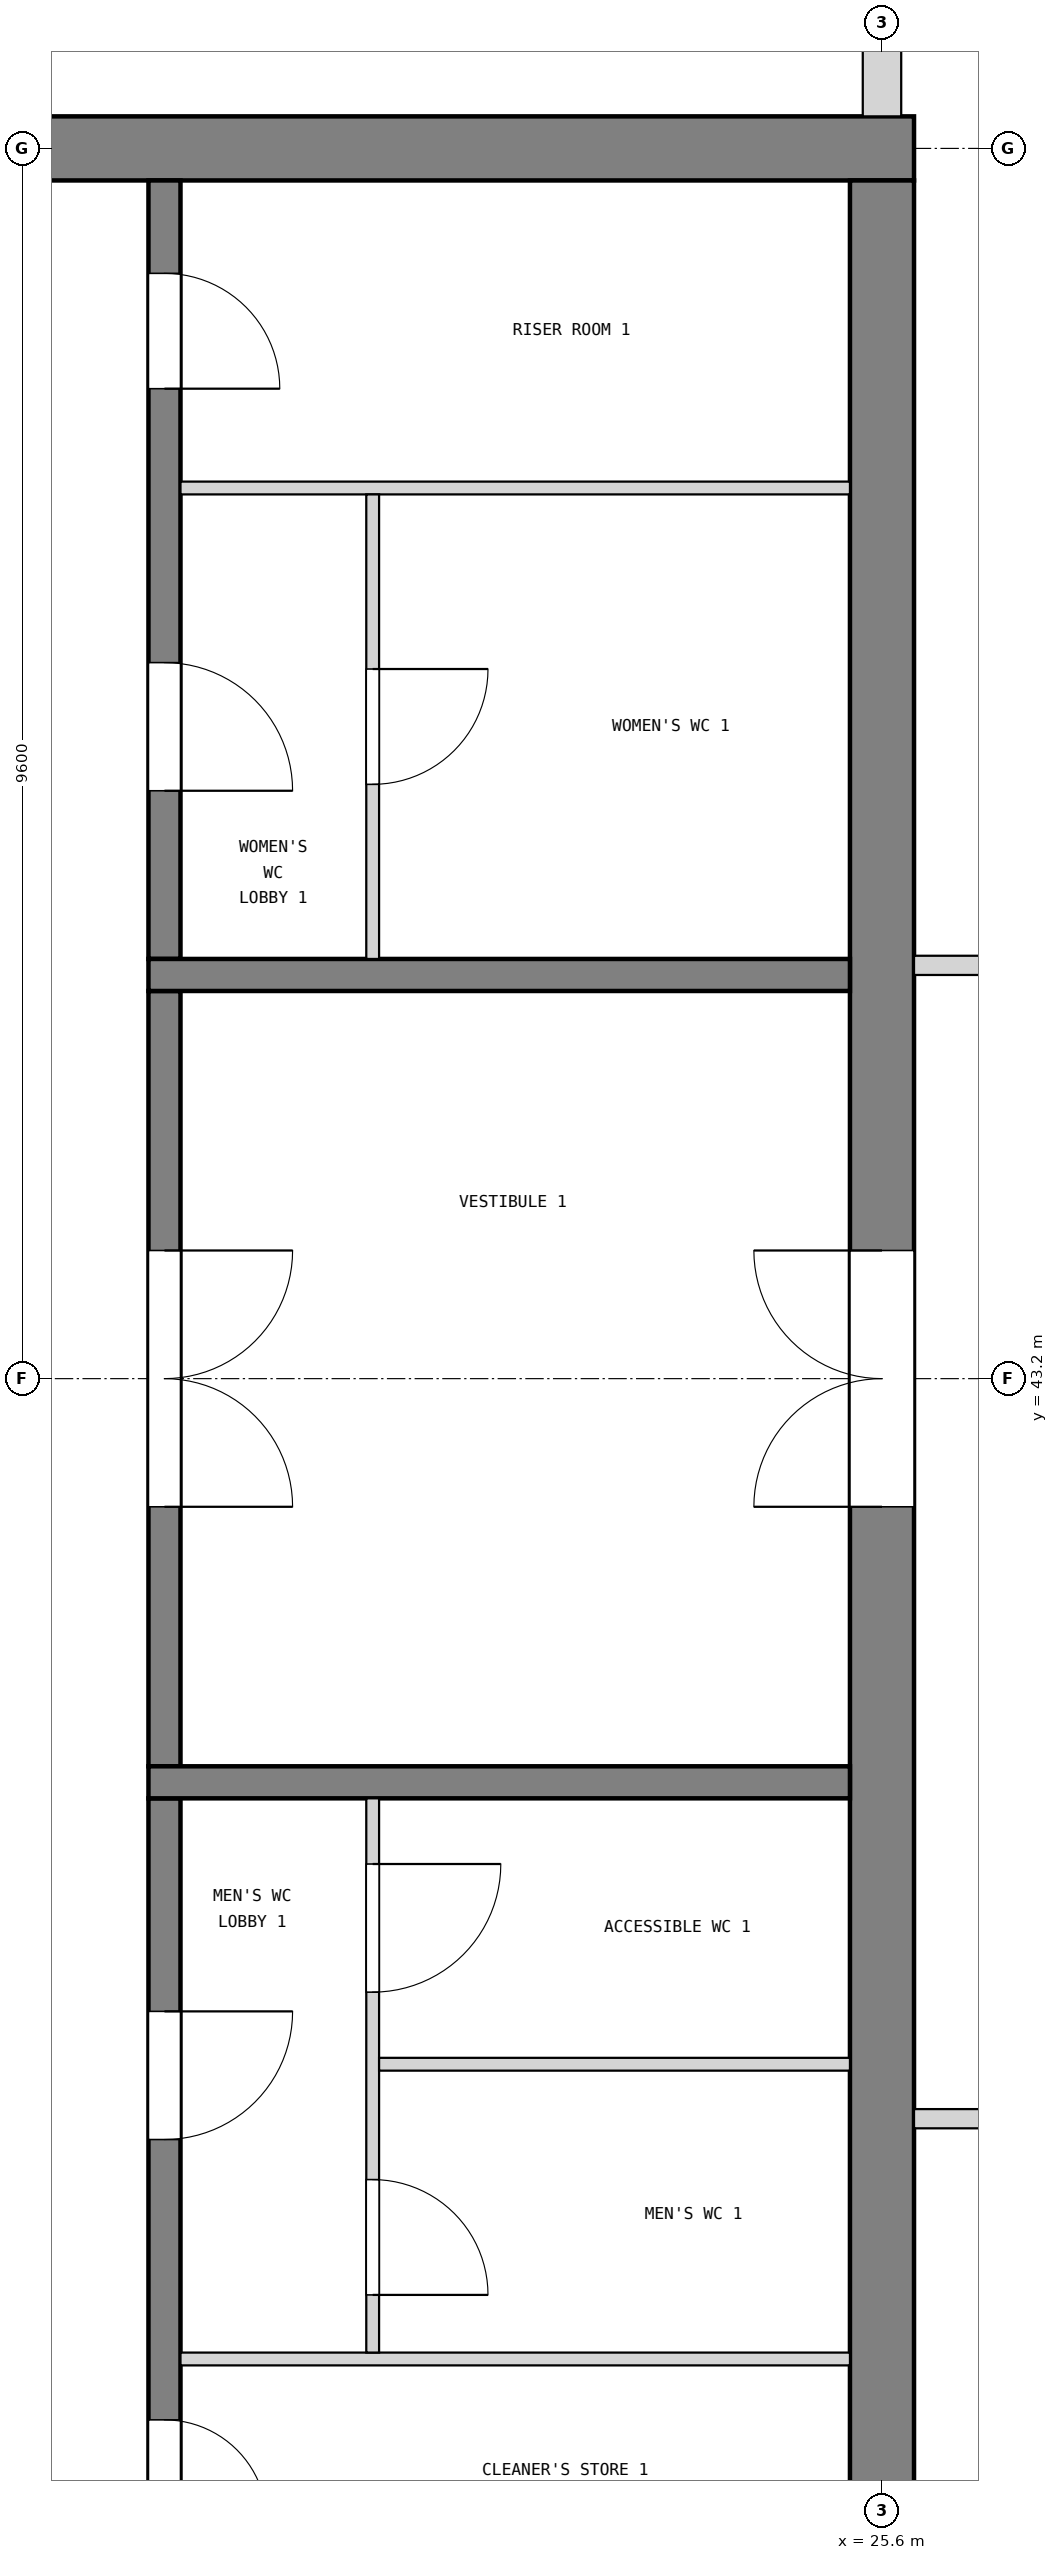
"""IFC4 building model, lengths in metres.
Left out: names, types, materials, properties, quantities, classifications, styles, units other than length and angle.
Written with IfcOpenShell. Run it as: python <this file> out.ifc"""

import sys

from ifc_helpers import new_model, si_unit, direction, frame, frame_2d, origin, place, context, subcontext, project, spatial, rectangle, extrude, element, fill, save


model = new_model("IFC4")
c1 = context("Model", 3, precision=1e-05, world=origin(), true_north=direction((0.0, 1.0)))
c2 = subcontext(c1, "Body", "Model", "MODEL_VIEW")
j1 = project(units=[si_unit("LENGTHUNIT", "METRE"), si_unit("PLANEANGLEUNIT", "RADIAN")], contexts=[c1])
p1 = place(None, origin())
s1 = spatial("IfcSite", under=j1, at=p1, CompositionType="ELEMENT")
p2 = place(p1, origin())
s2 = spatial("IfcBuilding", under=s1, at=p2, CompositionType="ELEMENT")
p3 = place(p2, frame((0.0, 0.0, 28.8)))
s3 = spatial("IfcBuildingStorey", under=s2, at=p3, CompositionType="ELEMENT", Elevation=28.8)
p4 = place(p3, frame((12.55, 52.8, 0.0), z_axis=(0.0, 0.0, 1.0), x_axis=(1.0, 0.0, 0.0)))
e1 = element("IfcWall", 1, at=p4, inside=s3, PredefinedType="SHEAR", context=c2, shape_type="SweptSolid", body=[
    extrude(rectangle(XDim=13.3, YDim=0.5, at=frame_2d((6.65, 0.0))), origin(), (0.0, 0.0, 1.0), 3.9),
])
p5 = place(p4, frame((1.85, 0.0, 1.0)))
e2 = element("IfcOpeningElement", 2, at=p5, cuts=e1, PredefinedType="OPENING", context=c2, shape_type="SweptSolid", body=[
    extrude(rectangle(XDim=0.4, YDim=2.0, at=frame_2d((0.2, 1.0))), frame((0.0, 0.26, 0.0), z_axis=(0.0, -1.0, 0.0), x_axis=(1.0, 0.0, 0.0)), (0.0, 0.0, 1.0), 0.52),
])
p6 = place(p3, frame((25.6, 33.85, 0.0), z_axis=(0.0, 0.0, 1.0), x_axis=(0.0, 1.0, 0.0)))
e3 = element("IfcWall", 3, at=p6, inside=s3, PredefinedType="SHEAR", context=c2, shape_type="SweptSolid", body=[
    extrude(rectangle(XDim=18.7, YDim=0.5, at=frame_2d((9.35, 0.0))), origin(), (0.0, 0.0, 1.0), 3.9),
])
p7 = place(p6, frame((8.35, 0.0, 0.0)))
e4 = element("IfcOpeningElement", 4, at=p7, cuts=e3, PredefinedType="OPENING", context=c2, shape_type="SweptSolid", body=[
    extrude(rectangle(XDim=2.0, YDim=2.1, at=frame_2d((1.0, 1.05))), frame((0.0, 0.26, 0.0), z_axis=(0.0, -1.0, 0.0), x_axis=(1.0, 0.0, 0.0)), (0.0, 0.0, 1.0), 0.52),
])
p8 = place(p3, frame((25.6, 53.05, 0.0), z_axis=(0.0, 0.0, 1.0), x_axis=(0.0, 1.0, 0.0)))
e5 = element("IfcWall", 5, at=p8, inside=s3, PredefinedType="SOLIDWALL", context=c2, shape_type="SweptSolid", body=[
    extrude(rectangle(XDim=2.35, YDim=0.3, at=frame_2d((1.175, 0.0))), origin(), (0.0, 0.0, 1.0), 2.88),
])
p9 = place(p3, frame((20.0, 33.85, 0.0), z_axis=(0.0, 0.0, 1.0), x_axis=(0.0, 1.0, 0.0)))
e6 = element("IfcWall", 6, at=p9, inside=s3, PredefinedType="SOLIDWALL", context=c2, shape_type="SweptSolid", body=[
    extrude(rectangle(XDim=6.075, YDim=0.25, at=frame_2d((3.038, 0.0))), origin(), (0.0, 0.0, 1.0), 3.6),
])
p10 = place(p9, frame((0.425, 0.0, 0.0)))
e7 = element("IfcOpeningElement", 7, at=p10, cuts=e6, PredefinedType="OPENING", context=c2, shape_type="SweptSolid", body=[
    extrude(rectangle(XDim=0.8, YDim=2.1, at=frame_2d((0.4, 1.05))), frame((0.0, 0.135, 0.0), z_axis=(0.0, -1.0, 0.0), x_axis=(1.0, 0.0, 0.0)), (0.0, 0.0, 1.0), 0.27),
])
p11 = place(p9, frame((3.413, 0.0, 0.0)))
e8 = element("IfcOpeningElement", 8, at=p11, cuts=e6, PredefinedType="OPENING", context=c2, shape_type="SweptSolid", body=[
    extrude(rectangle(XDim=1.0, YDim=2.1, at=frame_2d((0.5, 1.05))), frame((0.0, 0.135, 0.0), z_axis=(0.0, -1.0, 0.0), x_axis=(1.0, 0.0, 0.0)), (0.0, 0.0, 1.0), 0.27),
])
p12 = place(p3, frame((20.0, 40.175, 0.0), z_axis=(0.0, 0.0, 1.0), x_axis=(0.0, 1.0, 0.0)))
e9 = element("IfcWall", 9, at=p12, inside=s3, PredefinedType="SOLIDWALL", context=c2, shape_type="SweptSolid", body=[
    extrude(rectangle(XDim=6.05, YDim=0.25, at=frame_2d((3.025, 0.0))), origin(), (0.0, 0.0, 1.0), 3.6),
])
p13 = place(p12, frame((2.025, 0.0, 0.0)))
e10 = element("IfcOpeningElement", 10, at=p13, cuts=e9, PredefinedType="OPENING", context=c2, shape_type="SweptSolid", body=[
    extrude(rectangle(XDim=2.0, YDim=2.1, at=frame_2d((1.0, 1.05))), frame((0.0, 0.135, 0.0), z_axis=(0.0, -1.0, 0.0), x_axis=(1.0, 0.0, 0.0)), (0.0, 0.0, 1.0), 0.27),
])
p14 = place(p3, frame((20.0, 46.475, 0.0), z_axis=(0.0, 0.0, 1.0), x_axis=(0.0, 1.0, 0.0)))
e11 = element("IfcWall", 11, at=p14, inside=s3, PredefinedType="SOLIDWALL", context=c2, shape_type="SweptSolid", body=[
    extrude(rectangle(XDim=6.075, YDim=0.25, at=frame_2d((3.038, 0.0))), origin(), (0.0, 0.0, 1.0), 3.6),
])
p15 = place(p14, frame((1.312, 0.0, 0.0)))
e12 = element("IfcOpeningElement", 12, at=p15, cuts=e11, PredefinedType="OPENING", context=c2, shape_type="SweptSolid", body=[
    extrude(rectangle(XDim=1.0, YDim=2.1, at=frame_2d((0.5, 1.05))), frame((0.0, 0.135, 0.0), z_axis=(0.0, -1.0, 0.0), x_axis=(1.0, 0.0, 0.0)), (0.0, 0.0, 1.0), 0.27),
])
p16 = place(p14, frame((4.45, 0.0, 0.0)))
e13 = element("IfcOpeningElement", 13, at=p16, cuts=e11, PredefinedType="OPENING", context=c2, shape_type="SweptSolid", body=[
    extrude(rectangle(XDim=0.9, YDim=2.1, at=frame_2d((0.45, 1.05))), frame((0.0, 0.135, 0.0), z_axis=(0.0, -1.0, 0.0), x_axis=(1.0, 0.0, 0.0)), (0.0, 0.0, 1.0), 0.27),
])
for number, where, z_axis, x_axis in (
    (14, (19.875, 40.05, 0.0), (0.0, 0.0, 1.0), (1.0, 0.0, 0.0)),
    (15, (19.875, 46.35, 0.0), (0.0, 0.0, 1.0), (1.0, 0.0, 0.0)),
):
    element("IfcWall", number, at=place(p3, frame(where, z_axis=z_axis, x_axis=x_axis)), inside=s3, PredefinedType="SOLIDWALL", context=c2, shape_type="SweptSolid", body=[
        extrude(rectangle(XDim=5.475, YDim=0.25, at=frame_2d((2.738, 0.0))), origin(), (0.0, 0.0, 1.0), 3.6),
    ])
p17 = place(p3, frame((20.125, 35.55, 0.0), z_axis=(0.0, 0.0, 1.0), x_axis=(1.0, 0.0, 0.0)))
e16 = element("IfcWall", 16, at=p17, inside=s3, PredefinedType="PARTITIONING", context=c2, shape_type="SweptSolid", body=[
    extrude(rectangle(XDim=5.225, YDim=0.1, at=frame_2d((2.613, 0.0))), origin(), (0.0, 0.0, 1.0), 3.6),
])
p18 = place(p3, frame((21.625, 35.6, 0.0), z_axis=(0.0, 0.0, 1.0), x_axis=(0.0, 1.0, 0.0)))
e17 = element("IfcWall", 17, at=p18, inside=s3, PredefinedType="PARTITIONING", context=c2, shape_type="SweptSolid", body=[
    extrude(rectangle(XDim=4.325, YDim=0.1, at=frame_2d((2.163, 0.0))), origin(), (0.0, 0.0, 1.0), 3.6),
])
p19 = place(p18, frame((0.45, 0.0, 0.0)))
e18 = element("IfcOpeningElement", 18, at=p19, cuts=e17, PredefinedType="OPENING", context=c2, shape_type="SweptSolid", body=[
    extrude(rectangle(XDim=0.9, YDim=2.1, at=frame_2d((0.45, 1.05))), frame((0.0, 0.06, 0.0), z_axis=(0.0, -1.0, 0.0), x_axis=(1.0, 0.0, 0.0)), (0.0, 0.0, 1.0), 0.12),
])
p20 = place(p18, frame((2.812, 0.0, 0.0)))
e19 = element("IfcOpeningElement", 19, at=p20, cuts=e17, PredefinedType="OPENING", context=c2, shape_type="SweptSolid", body=[
    extrude(rectangle(XDim=1.0, YDim=2.1, at=frame_2d((0.5, 1.05))), frame((0.0, 0.06, 0.0), z_axis=(0.0, -1.0, 0.0), x_axis=(1.0, 0.0, 0.0)), (0.0, 0.0, 1.0), 0.12),
])
p21 = place(p3, frame((21.675, 37.85, 0.0), z_axis=(0.0, 0.0, 1.0), x_axis=(1.0, 0.0, 0.0)))
e20 = element("IfcWall", 20, at=p21, inside=s3, PredefinedType="PARTITIONING", context=c2, shape_type="SweptSolid", body=[
    extrude(rectangle(XDim=3.675, YDim=0.1, at=frame_2d((1.837, 0.0))), origin(), (0.0, 0.0, 1.0), 3.6),
])
p22 = place(p3, frame((20.125, 50.15, 0.0), z_axis=(0.0, 0.0, 1.0), x_axis=(1.0, 0.0, 0.0)))
e21 = element("IfcWall", 21, at=p22, inside=s3, PredefinedType="PARTITIONING", context=c2, shape_type="SweptSolid", body=[
    extrude(rectangle(XDim=5.225, YDim=0.1, at=frame_2d((2.613, 0.0))), origin(), (0.0, 0.0, 1.0), 3.6),
])
p23 = place(p3, frame((21.625, 46.475, 0.0), z_axis=(0.0, 0.0, 1.0), x_axis=(0.0, 1.0, 0.0)))
e22 = element("IfcWall", 22, at=p23, inside=s3, PredefinedType="PARTITIONING", context=c2, shape_type="SweptSolid", body=[
    extrude(rectangle(XDim=3.625, YDim=0.1, at=frame_2d((1.812, 0.0))), origin(), (0.0, 0.0, 1.0), 3.6),
])
p24 = place(p23, frame((1.363, 0.0, 0.0)))
e23 = element("IfcOpeningElement", 23, at=p24, cuts=e22, PredefinedType="OPENING", context=c2, shape_type="SweptSolid", body=[
    extrude(rectangle(XDim=0.9, YDim=2.1, at=frame_2d((0.45, 1.05))), frame((0.0, 0.06, 0.0), z_axis=(0.0, -1.0, 0.0), x_axis=(1.0, 0.0, 0.0)), (0.0, 0.0, 1.0), 0.12),
])
p25 = place(p3, frame((25.85, 37.425, 0.0), z_axis=(0.0, 0.0, 1.0), x_axis=(1.0, 0.0, 0.0)))
e24 = element("IfcWall", 24, at=p25, inside=s3, PredefinedType="PARTITIONING", context=c2, shape_type="SweptSolid", body=[
    extrude(rectangle(XDim=2.95, YDim=0.15, at=frame_2d((1.475, 0.0))), origin(), (0.0, 0.0, 1.0), 3.68),
])
p26 = place(p25, frame((0.95, 0.0, 0.0)))
e25 = element("IfcOpeningElement", 25, at=p26, cuts=e24, PredefinedType="OPENING", context=c2, shape_type="SweptSolid", body=[
    extrude(rectangle(XDim=1.0, YDim=2.1, at=frame_2d((0.5, 1.05))), frame((0.0, 0.085, 0.0), z_axis=(0.0, -1.0, 0.0), x_axis=(1.0, 0.0, 0.0)), (0.0, 0.0, 1.0), 0.17),
])
p27 = place(p3, frame((25.85, 46.425, 0.0), z_axis=(0.0, 0.0, 1.0), x_axis=(1.0, 0.0, 0.0)))
e26 = element("IfcWall", 26, at=p27, inside=s3, PredefinedType="PARTITIONING", context=c2, shape_type="SweptSolid", body=[
    extrude(rectangle(XDim=5.97, YDim=0.15, at=frame_2d((2.985, 0.0))), origin(), (0.0, 0.0, 1.0), 3.68),
])
p28 = place(p27, frame((2.45, 0.0, 0.0)))
e27 = element("IfcOpeningElement", 27, at=p28, cuts=e26, PredefinedType="OPENING", context=c2, shape_type="SweptSolid", body=[
    extrude(rectangle(XDim=1.0, YDim=2.1, at=frame_2d((0.5, 1.05))), frame((0.0, 0.085, 0.0), z_axis=(0.0, -1.0, 0.0), x_axis=(1.0, 0.0, 0.0)), (0.0, 0.0, 1.0), 0.17),
])
p29 = place(p13, frame((2.0, 0.0, 0.0), z_axis=(0.0, 0.0, 1.0), x_axis=(-1.0, 0.0, 0.0)))
e28 = element("IfcDoor", 28, at=p29, inside=s3, OperationType="DOUBLE_DOOR_SINGLE_SWING", PredefinedType="DOOR", context=c2, shape_type="SweptSolid", body=[
    extrude(rectangle(XDim=2.0, YDim=2.1, at=frame_2d((1.0, 1.05))), frame((0.0, 0.025, 0.0), z_axis=(0.0, -1.0, 0.0), x_axis=(1.0, 0.0, 0.0)), (0.0, 0.0, 1.0), 0.05),
])
fill(e10, e28)
p30 = place(p7, origin())
e29 = element("IfcDoor", 29, at=p30, inside=s3, OperationType="DOUBLE_DOOR_SINGLE_SWING", PredefinedType="DOOR", context=c2, shape_type="SweptSolid", body=[
    extrude(rectangle(XDim=2.0, YDim=2.1, at=frame_2d((1.0, 1.05))), frame((0.0, 0.025, 0.0), z_axis=(0.0, -1.0, 0.0), x_axis=(1.0, 0.0, 0.0)), (0.0, 0.0, 1.0), 0.05),
])
fill(e4, e29)
p31 = place(p10, frame((0.8, 0.0, 0.0), z_axis=(0.0, 0.0, 1.0), x_axis=(-1.0, 0.0, 0.0)))
e30 = element("IfcDoor", 30, at=p31, inside=s3, OperationType="SINGLE_SWING_RIGHT", PredefinedType="DOOR", context=c2, shape_type="SweptSolid", body=[
    extrude(rectangle(XDim=0.8, YDim=2.1, at=frame_2d((0.4, 1.05))), frame((0.0, 0.025, 0.0), z_axis=(0.0, -1.0, 0.0), x_axis=(1.0, 0.0, 0.0)), (0.0, 0.0, 1.0), 0.05),
])
fill(e7, e30)
p32 = place(p11, frame((1.0, 0.0, 0.0), z_axis=(0.0, 0.0, 1.0), x_axis=(-1.0, 0.0, 0.0)))
e31 = element("IfcDoor", 31, at=p32, inside=s3, OperationType="SINGLE_SWING_LEFT", PredefinedType="DOOR", context=c2, shape_type="SweptSolid", body=[
    extrude(rectangle(XDim=1.0, YDim=2.1, at=frame_2d((0.5, 1.05))), frame((0.0, 0.025, 0.0), z_axis=(0.0, -1.0, 0.0), x_axis=(1.0, 0.0, 0.0)), (0.0, 0.0, 1.0), 0.05),
])
fill(e8, e31)
p33 = place(p19, frame((0.9, 0.0, 0.0), z_axis=(0.0, 0.0, 1.0), x_axis=(-1.0, 0.0, 0.0)))
e32 = element("IfcDoor", 32, at=p33, inside=s3, OperationType="SINGLE_SWING_RIGHT", PredefinedType="DOOR", context=c2, shape_type="SweptSolid", body=[
    extrude(rectangle(XDim=0.9, YDim=2.1, at=frame_2d((0.45, 1.05))), frame((0.0, 0.025, 0.0), z_axis=(0.0, -1.0, 0.0), x_axis=(1.0, 0.0, 0.0)), (0.0, 0.0, 1.0), 0.05),
])
fill(e18, e32)
p34 = place(p20, frame((1.0, 0.0, 0.0), z_axis=(0.0, 0.0, 1.0), x_axis=(-1.0, 0.0, 0.0)))
e33 = element("IfcDoor", 33, at=p34, inside=s3, OperationType="SINGLE_SWING_LEFT", PredefinedType="DOOR", context=c2, shape_type="SweptSolid", body=[
    extrude(rectangle(XDim=1.0, YDim=2.1, at=frame_2d((0.5, 1.05))), frame((0.0, 0.025, 0.0), z_axis=(0.0, -1.0, 0.0), x_axis=(1.0, 0.0, 0.0)), (0.0, 0.0, 1.0), 0.05),
])
fill(e19, e33)
p35 = place(p15, frame((1.0, 0.0, 0.0), z_axis=(0.0, 0.0, 1.0), x_axis=(-1.0, 0.0, 0.0)))
e34 = element("IfcDoor", 34, at=p35, inside=s3, OperationType="SINGLE_SWING_RIGHT", PredefinedType="DOOR", context=c2, shape_type="SweptSolid", body=[
    extrude(rectangle(XDim=1.0, YDim=2.1, at=frame_2d((0.5, 1.05))), frame((0.0, 0.025, 0.0), z_axis=(0.0, -1.0, 0.0), x_axis=(1.0, 0.0, 0.0)), (0.0, 0.0, 1.0), 0.05),
])
fill(e12, e34)
p36 = place(p24, frame((0.9, 0.0, 0.0), z_axis=(0.0, 0.0, 1.0), x_axis=(-1.0, 0.0, 0.0)))
e35 = element("IfcDoor", 35, at=p36, inside=s3, OperationType="SINGLE_SWING_LEFT", PredefinedType="DOOR", context=c2, shape_type="SweptSolid", body=[
    extrude(rectangle(XDim=0.9, YDim=2.1, at=frame_2d((0.45, 1.05))), frame((0.0, 0.025, 0.0), z_axis=(0.0, -1.0, 0.0), x_axis=(1.0, 0.0, 0.0)), (0.0, 0.0, 1.0), 0.05),
])
fill(e23, e35)
p37 = place(p16, frame((0.9, 0.0, 0.0), z_axis=(0.0, 0.0, 1.0), x_axis=(-1.0, 0.0, 0.0)))
e36 = element("IfcDoor", 36, at=p37, inside=s3, OperationType="SINGLE_SWING_RIGHT", PredefinedType="DOOR", context=c2, shape_type="SweptSolid", body=[
    extrude(rectangle(XDim=0.9, YDim=2.1, at=frame_2d((0.45, 1.05))), frame((0.0, 0.025, 0.0), z_axis=(0.0, -1.0, 0.0), x_axis=(1.0, 0.0, 0.0)), (0.0, 0.0, 1.0), 0.05),
])
fill(e13, e36)
save(model, sys.argv[1])
